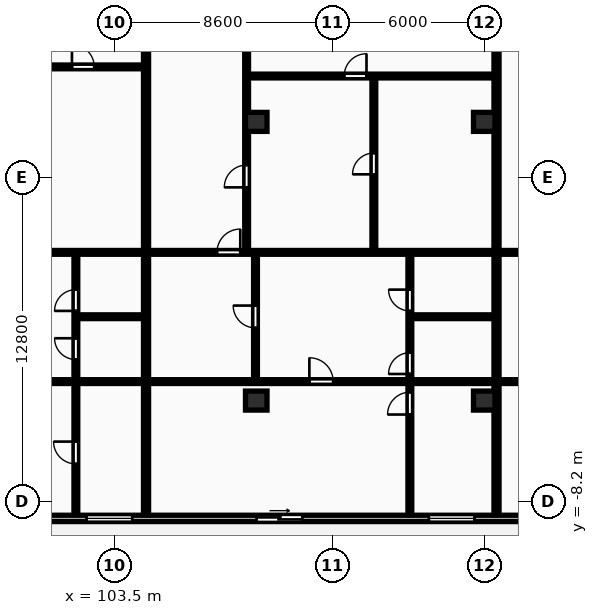
"""IFC4 building model, lengths in metres.
Left out: names, types, materials, properties, quantities, classifications, styles, units other than length and angle.
Written with IfcOpenShell. Run it as: python <this file> out.ifc"""

import sys

from ifc_helpers import new_model, si_unit, direction, frame, frame_2d, origin, origin_2d, place, context, subcontext, project, spatial, rectangle, extrude, element, fill, save


model = new_model("IFC4")
c1 = context("Model", 3, precision=1e-05, world=origin(), true_north=direction((0.0, 1.0)))
c2 = subcontext(c1, "Body", "Model", "MODEL_VIEW")
j1 = project(units=[si_unit("LENGTHUNIT", "METRE"), si_unit("PLANEANGLEUNIT", "RADIAN")], contexts=[c1])
p1 = place(None, origin())
s1 = spatial("IfcSite", under=j1, at=p1, CompositionType="ELEMENT")
p2 = place(p1, origin())
s2 = spatial("IfcBuilding", under=s1, at=p2, CompositionType="ELEMENT")
p3 = place(p2, frame((0.0, 0.0, 113.3)))
s3 = spatial("IfcBuildingStorey", under=s2, at=p3, CompositionType="ELEMENT", Elevation=113.3)
for number, where, z_axis, x_axis in (
    (1, (109.1, -4.2, 0.0), (0.0, 0.0, 1.0), (1.0, 0.0, 0.0)),
    (2, (109.1, 6.8, 0.0), (0.0, 0.0, 1.0), (1.0, 0.0, 0.0)),
    (3, (118.1, -4.2, 0.0), (0.0, 0.0, 1.0), (1.0, 0.0, 0.0)),
    (4, (118.1, 6.8, 0.0), (0.0, 0.0, 1.0), (1.0, 0.0, 0.0)),
):
    element("IfcColumn", number, at=place(p3, frame(where, z_axis=z_axis, x_axis=x_axis)), inside=s3, PredefinedType="COLUMN", context=c2, shape_type="SweptSolid", body=[
        extrude(rectangle(XDim=0.85, YDim=0.75, at=origin_2d()), origin(), (0.0, 0.0, 1.0), 3.25),
    ])
p4 = place(p3, frame((72.7, -8.85, 0.0), z_axis=(0.0, 0.0, 1.0), x_axis=(1.0, 0.0, 0.0)))
e5 = element("IfcWall", 5, at=p4, inside=s3, PredefinedType="STANDARD", context=c2, shape_type="SweptSolid", body=[
    extrude(rectangle(XDim=58.0, YDim=0.25, at=frame_2d((29.0, 0.0))), origin(), (0.0, 0.0, 1.0), 2.97),
])
p5 = place(p4, frame((3.358, 0.0, 0.0)))
e6 = element("IfcOpeningElement", 6, at=p5, cuts=e5, PredefinedType="OPENING", context=c2, shape_type="SweptSolid", body=[
    extrude(rectangle(XDim=1.8, YDim=2.2, at=frame_2d((0.9, 1.1))), frame((0.0, 0.135, 0.0), z_axis=(0.0, -1.0, 0.0), x_axis=(1.0, 0.0, 0.0)), (0.0, 0.0, 1.0), 0.27),
])
p6 = place(p4, frame((12.755, 0.0, 0.85)))
e7 = element("IfcOpeningElement", 7, at=p6, cuts=e5, PredefinedType="OPENING", context=c2, shape_type="SweptSolid", body=[
    extrude(rectangle(XDim=2.4, YDim=1.9, at=frame_2d((1.2, 0.95))), frame((0.0, 0.135, 0.0), z_axis=(0.0, -1.0, 0.0), x_axis=(1.0, 0.0, 0.0)), (0.0, 0.0, 1.0), 0.27),
])
p7 = place(p4, frame((23.617, 0.0, 0.0)))
e8 = element("IfcOpeningElement", 8, at=p7, cuts=e5, PredefinedType="OPENING", context=c2, shape_type="SweptSolid", body=[
    extrude(rectangle(XDim=1.8, YDim=2.2, at=frame_2d((0.9, 1.1))), frame((0.0, 0.135, 0.0), z_axis=(0.0, -1.0, 0.0), x_axis=(1.0, 0.0, 0.0)), (0.0, 0.0, 1.0), 0.27),
])
p8 = place(p4, frame((29.705, 0.0, 0.85)))
e9 = element("IfcOpeningElement", 9, at=p8, cuts=e5, PredefinedType="OPENING", context=c2, shape_type="SweptSolid", body=[
    extrude(rectangle(XDim=1.8, YDim=1.8, at=frame_2d((0.9, 0.9))), frame((0.0, 0.135, 0.0), z_axis=(0.0, -1.0, 0.0), x_axis=(1.0, 0.0, 0.0)), (0.0, 0.0, 1.0), 0.27),
])
p9 = place(p4, frame((36.417, 0.0, 0.0)))
e10 = element("IfcOpeningElement", 10, at=p9, cuts=e5, PredefinedType="OPENING", context=c2, shape_type="SweptSolid", body=[
    extrude(rectangle(XDim=1.8, YDim=2.2, at=frame_2d((0.9, 1.1))), frame((0.0, 0.135, 0.0), z_axis=(0.0, -1.0, 0.0), x_axis=(1.0, 0.0, 0.0)), (0.0, 0.0, 1.0), 0.27),
])
p10 = place(p4, frame((43.213, 0.0, 0.85)))
e11 = element("IfcOpeningElement", 11, at=p10, cuts=e5, PredefinedType="OPENING", context=c2, shape_type="SweptSolid", body=[
    extrude(rectangle(XDim=1.8, YDim=1.8, at=frame_2d((0.9, 0.9))), frame((0.0, 0.135, 0.0), z_axis=(0.0, -1.0, 0.0), x_axis=(1.0, 0.0, 0.0)), (0.0, 0.0, 1.0), 0.27),
])
p11 = place(p4, frame((49.262, 0.0, 0.0)))
e12 = element("IfcOpeningElement", 12, at=p11, cuts=e5, PredefinedType="OPENING", context=c2, shape_type="SweptSolid", body=[
    extrude(rectangle(XDim=1.8, YDim=2.2, at=frame_2d((0.9, 1.1))), frame((0.0, 0.135, 0.0), z_axis=(0.0, -1.0, 0.0), x_axis=(1.0, 0.0, 0.0)), (0.0, 0.0, 1.0), 0.27),
])
p12 = place(p4, frame((54.9, 0.0, 0.85)))
e13 = element("IfcOpeningElement", 13, at=p12, cuts=e5, PredefinedType="OPENING", context=c2, shape_type="SweptSolid", body=[
    extrude(rectangle(XDim=2.4, YDim=1.9, at=frame_2d((1.2, 0.95))), frame((0.0, 0.135, 0.0), z_axis=(0.0, -1.0, 0.0), x_axis=(1.0, 0.0, 0.0)), (0.0, 0.0, 1.0), 0.27),
])
p13 = place(p3, frame((104.75, -8.7, 0.0), z_axis=(0.0, 0.0, 1.0), x_axis=(0.0, 1.0, 0.0)))
e14 = element("IfcWall", 14, at=p13, inside=s3, PredefinedType="PARTITIONING", context=c2, shape_type="SweptSolid", body=[
    extrude(rectangle(XDim=24.57, YDim=0.2, at=frame_2d((12.285, 0.0))), origin(), (0.0, 0.0, 1.0), 2.97),
])
p14 = place(p3, frame((96.363, 8.97, 0.0), z_axis=(0.0, 0.0, 1.0), x_axis=(1.0, 0.0, 0.0)))
e15 = element("IfcWall", 15, at=p14, inside=s3, PredefinedType="PARTITIONING", context=c2, shape_type="SweptSolid", body=[
    extrude(rectangle(XDim=8.307, YDim=0.15, at=frame_2d((4.153, 0.0))), origin(), (0.0, 0.0, 1.0), 2.97),
])
p15 = place(p14, frame((5.462, 0.0, 0.0)))
e16 = element("IfcOpeningElement", 16, at=p15, cuts=e15, PredefinedType="OPENING", context=c2, shape_type="SweptSolid", body=[
    extrude(rectangle(XDim=0.88, YDim=2.06, at=frame_2d((0.44, 1.03))), frame((0.0, 0.085, 0.0), z_axis=(0.0, -1.0, 0.0), x_axis=(1.0, 0.0, 0.0)), (0.0, 0.0, 1.0), 0.17),
])
p16 = place(p3, frame((102.04, -0.89, 0.0), z_axis=(0.0, 0.0, 1.0), x_axis=(1.0, 0.0, 0.0)))
e17 = element("IfcWall", 17, at=p16, inside=s3, PredefinedType="PARTITIONING", context=c2, shape_type="SweptSolid", body=[
    extrude(rectangle(XDim=2.63, YDim=0.15, at=frame_2d((1.315, 0.0))), origin(), (0.0, 0.0, 1.0), 2.97),
])
p17 = place(p3, frame((101.98, -8.7, 0.0), z_axis=(0.0, 0.0, 1.0), x_axis=(0.0, 1.0, 0.0)))
e18 = element("IfcWall", 18, at=p17, inside=s3, PredefinedType="PARTITIONING", context=c2, shape_type="SweptSolid", body=[
    extrude(rectangle(XDim=10.31, YDim=0.15, at=frame_2d((5.155, 0.0))), origin(), (0.0, 0.0, 1.0), 2.97),
])
p18 = place(p17, frame((6.12, 0.0, 0.0)))
e19 = element("IfcOpeningElement", 19, at=p18, cuts=e18, PredefinedType="OPENING", context=c2, shape_type="SweptSolid", body=[
    extrude(rectangle(XDim=0.84, YDim=2.04, at=frame_2d((0.42, 1.02))), frame((0.0, 0.085, 0.0), z_axis=(0.0, -1.0, 0.0), x_axis=(1.0, 0.0, 0.0)), (0.0, 0.0, 1.0), 0.17),
])
p19 = place(p17, frame((8.04, 0.0, 0.0)))
e20 = element("IfcOpeningElement", 20, at=p19, cuts=e18, PredefinedType="OPENING", context=c2, shape_type="SweptSolid", body=[
    extrude(rectangle(XDim=0.84, YDim=2.04, at=frame_2d((0.42, 1.02))), frame((0.0, 0.085, 0.0), z_axis=(0.0, -1.0, 0.0), x_axis=(1.0, 0.0, 0.0)), (0.0, 0.0, 1.0), 0.17),
])
p20 = place(p17, frame((2.001, 0.0, 0.0)))
e21 = element("IfcOpeningElement", 21, at=p20, cuts=e18, PredefinedType="OPENING", context=c2, shape_type="SweptSolid", body=[
    extrude(rectangle(XDim=0.88, YDim=2.06, at=frame_2d((0.44, 1.03))), frame((0.0, 0.085, 0.0), z_axis=(0.0, -1.0, 0.0), x_axis=(1.0, 0.0, 0.0)), (0.0, 0.0, 1.0), 0.17),
])
p21 = place(p3, frame((92.413, 1.65, 0.0), z_axis=(0.0, 0.0, 1.0), x_axis=(1.0, 0.0, 0.0)))
e22 = element("IfcWall", 22, at=p21, inside=s3, PredefinedType="PARTITIONING", context=c2, shape_type="SweptSolid", body=[
    extrude(rectangle(XDim=12.257, YDim=0.15, at=frame_2d((6.128, 0.0))), origin(), (0.0, 0.0, 1.0), 2.97),
])
p22 = place(p21, frame((2.72, 0.0, 0.0)))
e23 = element("IfcOpeningElement", 23, at=p22, cuts=e22, PredefinedType="OPENING", context=c2, shape_type="SweptSolid", body=[
    extrude(rectangle(XDim=0.92, YDim=2.08, at=frame_2d((0.46, 1.04))), frame((0.0, 0.085, 0.0), z_axis=(0.0, -1.0, 0.0), x_axis=(1.0, 0.0, 0.0)), (0.0, 0.0, 1.0), 0.17),
])
p23 = place(p3, frame((92.413, -3.45, 0.0), z_axis=(0.0, 0.0, 1.0), x_axis=(1.0, 0.0, 0.0)))
e24 = element("IfcWall", 24, at=p23, inside=s3, PredefinedType="PARTITIONING", context=c2, shape_type="SweptSolid", body=[
    extrude(rectangle(XDim=12.257, YDim=0.15, at=frame_2d((6.128, 0.0))), origin(), (0.0, 0.0, 1.0), 2.97),
])
p24 = place(p23, frame((5.126, 0.0, 0.0)))
e25 = element("IfcOpeningElement", 25, at=p24, cuts=e24, PredefinedType="OPENING", context=c2, shape_type="SweptSolid", body=[
    extrude(rectangle(XDim=0.94, YDim=2.1, at=frame_2d((0.47, 1.05))), frame((0.0, 0.085, 0.0), z_axis=(0.0, -1.0, 0.0), x_axis=(1.0, 0.0, 0.0)), (0.0, 0.0, 1.0), 0.17),
])
p25 = place(p3, frame((118.583, -8.7, 0.0), z_axis=(0.0, 0.0, 1.0), x_axis=(0.0, 1.0, 0.0)))
e26 = element("IfcWall", 26, at=p25, inside=s3, PredefinedType="PARTITIONING", context=c2, shape_type="SweptSolid", body=[
    extrude(rectangle(XDim=24.57, YDim=0.2, at=frame_2d((12.285, 0.0))), origin(), (0.0, 0.0, 1.0), 2.97),
])
p26 = place(p3, frame((113.742, 1.69, 0.0), z_axis=(0.0, 0.0, 1.0), x_axis=(0.0, 1.0, 0.0)))
e27 = element("IfcWall", 27, at=p26, inside=s3, PredefinedType="PARTITIONING", context=c2, shape_type="SweptSolid", body=[
    extrude(rectangle(XDim=6.92, YDim=0.15, at=frame_2d((3.46, 0.0))), origin(), (0.0, 0.0, 1.0), 2.97),
])
p27 = place(p26, frame((3.04, 0.0, 0.0)))
e28 = element("IfcOpeningElement", 28, at=p27, cuts=e27, PredefinedType="OPENING", context=c2, shape_type="SweptSolid", body=[
    extrude(rectangle(XDim=0.84, YDim=2.04, at=frame_2d((0.42, 1.02))), frame((0.0, 0.085, 0.0), z_axis=(0.0, -1.0, 0.0), x_axis=(1.0, 0.0, 0.0)), (0.0, 0.0, 1.0), 0.17),
])
p28 = place(p3, frame((108.78, 8.61, 0.0), z_axis=(0.0, 0.0, 1.0), x_axis=(1.0, 0.0, 0.0)))
e29 = element("IfcWall", 29, at=p28, inside=s3, PredefinedType="PARTITIONING", context=c2, shape_type="SweptSolid", body=[
    extrude(rectangle(XDim=9.723, YDim=0.15, at=frame_2d((4.862, 0.0))), origin(), (0.0, 0.0, 1.0), 2.97),
])
p29 = place(p28, frame((3.792, 0.0, 0.0)))
e30 = element("IfcOpeningElement", 30, at=p29, cuts=e29, PredefinedType="OPENING", context=c2, shape_type="SweptSolid", body=[
    extrude(rectangle(XDim=0.88, YDim=2.06, at=frame_2d((0.44, 1.03))), frame((0.0, 0.085, 0.0), z_axis=(0.0, -1.0, 0.0), x_axis=(1.0, 0.0, 0.0)), (0.0, 0.0, 1.0), 0.17),
])
p30 = place(p3, frame((108.72, 1.69, 0.0), z_axis=(0.0, 0.0, 1.0), x_axis=(0.0, 1.0, 0.0)))
e31 = element("IfcWall", 31, at=p30, inside=s3, PredefinedType="PARTITIONING", context=c2, shape_type="SweptSolid", body=[
    extrude(rectangle(XDim=14.2, YDim=0.15, at=frame_2d((7.1, 0.0))), origin(), (0.0, 0.0, 1.0), 2.97),
])
p31 = place(p30, frame((2.526, 0.0, 0.0)))
e32 = element("IfcOpeningElement", 32, at=p31, cuts=e31, PredefinedType="OPENING", context=c2, shape_type="SweptSolid", body=[
    extrude(rectangle(XDim=0.88, YDim=2.06, at=frame_2d((0.44, 1.03))), frame((0.0, 0.085, 0.0), z_axis=(0.0, -1.0, 0.0), x_axis=(1.0, 0.0, 0.0)), (0.0, 0.0, 1.0), 0.17),
])
p32 = place(p3, frame((109.07, -3.39, 0.0), z_axis=(0.0, 0.0, 1.0), x_axis=(0.0, 1.0, 0.0)))
e33 = element("IfcWall", 33, at=p32, inside=s3, PredefinedType="PARTITIONING", context=c2, shape_type="SweptSolid", body=[
    extrude(rectangle(XDim=5.0, YDim=0.15, at=frame_2d((2.5, 0.0))), origin(), (0.0, 0.0, 1.0), 2.2),
])
p33 = place(p32, frame((2.06, 0.0, 0.0)))
e34 = element("IfcOpeningElement", 34, at=p33, cuts=e33, PredefinedType="OPENING", context=c2, shape_type="SweptSolid", body=[
    extrude(rectangle(XDim=0.88, YDim=2.06, at=frame_2d((0.44, 1.03))), frame((0.0, 0.085, 0.0), z_axis=(0.0, -1.0, 0.0), x_axis=(1.0, 0.0, 0.0)), (0.0, 0.0, 1.0), 0.17),
])
p34 = place(p3, frame((115.223, -0.89, 0.0), z_axis=(0.0, 0.0, 1.0), x_axis=(1.0, 0.0, 0.0)))
e35 = element("IfcWall", 35, at=p34, inside=s3, PredefinedType="PARTITIONING", context=c2, shape_type="SweptSolid", body=[
    extrude(rectangle(XDim=3.28, YDim=0.15, at=frame_2d((1.64, 0.0))), origin(), (0.0, 0.0, 1.0), 2.97),
])
p35 = place(p3, frame((115.163, -8.7, 0.0), z_axis=(0.0, 0.0, 1.0), x_axis=(0.0, 1.0, 0.0)))
e36 = element("IfcWall", 36, at=p35, inside=s3, PredefinedType="PARTITIONING", context=c2, shape_type="SweptSolid", body=[
    extrude(rectangle(XDim=10.31, YDim=0.15, at=frame_2d((5.155, 0.0))), origin(), (0.0, 0.0, 1.0), 2.97),
])
p36 = place(p35, frame((5.55, 0.0, 0.0)))
e37 = element("IfcOpeningElement", 37, at=p36, cuts=e36, PredefinedType="OPENING", context=c2, shape_type="SweptSolid", body=[
    extrude(rectangle(XDim=0.84, YDim=2.04, at=frame_2d((0.42, 1.02))), frame((0.0, 0.085, 0.0), z_axis=(0.0, -1.0, 0.0), x_axis=(1.0, 0.0, 0.0)), (0.0, 0.0, 1.0), 0.17),
])
p37 = place(p35, frame((8.04, 0.0, 0.0)))
e38 = element("IfcOpeningElement", 38, at=p37, cuts=e36, PredefinedType="OPENING", context=c2, shape_type="SweptSolid", body=[
    extrude(rectangle(XDim=0.84, YDim=2.04, at=frame_2d((0.42, 1.02))), frame((0.0, 0.085, 0.0), z_axis=(0.0, -1.0, 0.0), x_axis=(1.0, 0.0, 0.0)), (0.0, 0.0, 1.0), 0.17),
])
p38 = place(p35, frame((3.95, 0.0, 0.0)))
e39 = element("IfcOpeningElement", 39, at=p38, cuts=e36, PredefinedType="OPENING", context=c2, shape_type="SweptSolid", body=[
    extrude(rectangle(XDim=0.88, YDim=2.06, at=frame_2d((0.44, 1.03))), frame((0.0, 0.085, 0.0), z_axis=(0.0, -1.0, 0.0), x_axis=(1.0, 0.0, 0.0)), (0.0, 0.0, 1.0), 0.17),
])
p39 = place(p3, frame((104.83, 1.65, 0.0), z_axis=(0.0, 0.0, 1.0), x_axis=(1.0, 0.0, 0.0)))
e40 = element("IfcWall", 40, at=p39, inside=s3, PredefinedType="PARTITIONING", context=c2, shape_type="SweptSolid", body=[
    extrude(rectangle(XDim=13.673, YDim=0.15, at=frame_2d((6.837, 0.0))), origin(), (0.0, 0.0, 1.0), 2.97),
])
p40 = place(p39, frame((2.72, 0.0, 0.0)))
e41 = element("IfcOpeningElement", 41, at=p40, cuts=e40, PredefinedType="OPENING", context=c2, shape_type="SweptSolid", body=[
    extrude(rectangle(XDim=0.92, YDim=2.08, at=frame_2d((0.46, 1.04))), frame((0.0, 0.085, 0.0), z_axis=(0.0, -1.0, 0.0), x_axis=(1.0, 0.0, 0.0)), (0.0, 0.0, 1.0), 0.17),
])
p41 = place(p3, frame((104.83, -3.45, 0.0), z_axis=(0.0, 0.0, 1.0), x_axis=(1.0, 0.0, 0.0)))
e42 = element("IfcWall", 42, at=p41, inside=s3, PredefinedType="PARTITIONING", context=c2, shape_type="SweptSolid", body=[
    extrude(rectangle(XDim=13.673, YDim=0.15, at=frame_2d((6.837, 0.0))), origin(), (0.0, 0.0, 1.0), 2.97),
])
p42 = place(p41, frame((6.367, 0.0, 0.0)))
e43 = element("IfcOpeningElement", 43, at=p42, cuts=e42, PredefinedType="OPENING", context=c2, shape_type="SweptSolid", body=[
    extrude(rectangle(XDim=0.94, YDim=2.1, at=frame_2d((0.47, 1.05))), frame((0.0, 0.085, 0.0), z_axis=(0.0, -1.0, 0.0), x_axis=(1.0, 0.0, 0.0)), (0.0, 0.0, 1.0), 0.17),
])
p43 = place(p3, frame((118.663, 1.65, 0.0), z_axis=(0.0, 0.0, 1.0), x_axis=(1.0, 0.0, 0.0)))
e44 = element("IfcWall", 44, at=p43, inside=s3, PredefinedType="PARTITIONING", context=c2, shape_type="SweptSolid", body=[
    extrude(rectangle(XDim=11.957, YDim=0.15, at=frame_2d((5.979, 0.0))), origin(), (0.0, 0.0, 1.0), 2.97),
])
p44 = place(p43, frame((2.72, 0.0, 0.0)))
e45 = element("IfcOpeningElement", 45, at=p44, cuts=e44, PredefinedType="OPENING", context=c2, shape_type="SweptSolid", body=[
    extrude(rectangle(XDim=0.92, YDim=2.08, at=frame_2d((0.46, 1.04))), frame((0.0, 0.085, 0.0), z_axis=(0.0, -1.0, 0.0), x_axis=(1.0, 0.0, 0.0)), (0.0, 0.0, 1.0), 0.17),
])
p45 = place(p3, frame((118.663, -3.45, 0.0), z_axis=(0.0, 0.0, 1.0), x_axis=(1.0, 0.0, 0.0)))
e46 = element("IfcWall", 46, at=p45, inside=s3, PredefinedType="PARTITIONING", context=c2, shape_type="SweptSolid", body=[
    extrude(rectangle(XDim=11.957, YDim=0.15, at=frame_2d((5.979, 0.0))), origin(), (0.0, 0.0, 1.0), 2.97),
])
p46 = place(p45, frame((6.613, 0.0, 0.0)))
e47 = element("IfcOpeningElement", 47, at=p46, cuts=e46, PredefinedType="OPENING", context=c2, shape_type="SweptSolid", body=[
    extrude(rectangle(XDim=0.94, YDim=2.1, at=frame_2d((0.47, 1.05))), frame((0.0, 0.085, 0.0), z_axis=(0.0, -1.0, 0.0), x_axis=(1.0, 0.0, 0.0)), (0.0, 0.0, 1.0), 0.17),
])
p47 = place(p8, origin())
e48 = element("IfcWindow", 48, at=p47, inside=s3, PartitioningType="SINGLE_PANEL", PredefinedType="WINDOW", context=c2, shape_type="SweptSolid", body=[
    extrude(rectangle(XDim=1.8, YDim=1.8, at=frame_2d((0.9, 0.9))), frame((0.0, 0.03, 0.0), z_axis=(0.0, -1.0, 0.0), x_axis=(1.0, 0.0, 0.0)), (0.0, 0.0, 1.0), 0.06),
])
fill(e9, e48)
p48 = place(p9, origin())
e49 = element("IfcDoor", 49, at=p48, inside=s3, OperationType="SLIDING_TO_RIGHT", PredefinedType="DOOR", context=c2, shape_type="SweptSolid", body=[
    extrude(rectangle(XDim=1.8, YDim=2.2, at=frame_2d((0.9, 1.1))), frame((0.0, 0.025, 0.0), z_axis=(0.0, -1.0, 0.0), x_axis=(1.0, 0.0, 0.0)), (0.0, 0.0, 1.0), 0.05),
])
fill(e10, e49)
p49 = place(p10, origin())
e50 = element("IfcWindow", 50, at=p49, inside=s3, PartitioningType="SINGLE_PANEL", PredefinedType="WINDOW", context=c2, shape_type="SweptSolid", body=[
    extrude(rectangle(XDim=1.8, YDim=1.8, at=frame_2d((0.9, 0.9))), frame((0.0, 0.03, 0.0), z_axis=(0.0, -1.0, 0.0), x_axis=(1.0, 0.0, 0.0)), (0.0, 0.0, 1.0), 0.06),
])
fill(e11, e50)
p50 = place(p15, origin())
e51 = element("IfcDoor", 51, at=p50, inside=s3, OperationType="SINGLE_SWING_LEFT", PredefinedType="DOOR", context=c2, shape_type="SweptSolid", body=[
    extrude(rectangle(XDim=0.88, YDim=2.06, at=frame_2d((0.44, 1.03))), frame((0.0, 0.025, 0.0), z_axis=(0.0, -1.0, 0.0), x_axis=(1.0, 0.0, 0.0)), (0.0, 0.0, 1.0), 0.05),
])
fill(e16, e51)
p51 = place(p18, origin())
e52 = element("IfcDoor", 52, at=p51, inside=s3, OperationType="SINGLE_SWING_RIGHT", PredefinedType="DOOR", context=c2, shape_type="SweptSolid", body=[
    extrude(rectangle(XDim=0.84, YDim=2.04, at=frame_2d((0.42, 1.02))), frame((0.0, 0.025, 0.0), z_axis=(0.0, -1.0, 0.0), x_axis=(1.0, 0.0, 0.0)), (0.0, 0.0, 1.0), 0.05),
])
fill(e19, e52)
p52 = place(p19, origin())
e53 = element("IfcDoor", 53, at=p52, inside=s3, OperationType="SINGLE_SWING_LEFT", PredefinedType="DOOR", context=c2, shape_type="SweptSolid", body=[
    extrude(rectangle(XDim=0.84, YDim=2.04, at=frame_2d((0.42, 1.02))), frame((0.0, 0.025, 0.0), z_axis=(0.0, -1.0, 0.0), x_axis=(1.0, 0.0, 0.0)), (0.0, 0.0, 1.0), 0.05),
])
fill(e20, e53)
p53 = place(p20, origin())
e54 = element("IfcDoor", 54, at=p53, inside=s3, OperationType="SINGLE_SWING_RIGHT", PredefinedType="DOOR", context=c2, shape_type="SweptSolid", body=[
    extrude(rectangle(XDim=0.88, YDim=2.06, at=frame_2d((0.44, 1.03))), frame((0.0, 0.025, 0.0), z_axis=(0.0, -1.0, 0.0), x_axis=(1.0, 0.0, 0.0)), (0.0, 0.0, 1.0), 0.05),
])
fill(e21, e54)
p54 = place(p27, origin())
e55 = element("IfcDoor", 55, at=p54, inside=s3, OperationType="SINGLE_SWING_LEFT", PredefinedType="DOOR", context=c2, shape_type="SweptSolid", body=[
    extrude(rectangle(XDim=0.84, YDim=2.04, at=frame_2d((0.42, 1.02))), frame((0.0, 0.025, 0.0), z_axis=(0.0, -1.0, 0.0), x_axis=(1.0, 0.0, 0.0)), (0.0, 0.0, 1.0), 0.05),
])
fill(e28, e55)
p55 = place(p29, origin())
e56 = element("IfcDoor", 56, at=p55, inside=s3, OperationType="SINGLE_SWING_RIGHT", PredefinedType="DOOR", context=c2, shape_type="SweptSolid", body=[
    extrude(rectangle(XDim=0.88, YDim=2.06, at=frame_2d((0.44, 1.03))), frame((0.0, 0.025, 0.0), z_axis=(0.0, -1.0, 0.0), x_axis=(1.0, 0.0, 0.0)), (0.0, 0.0, 1.0), 0.05),
])
fill(e30, e56)
p56 = place(p31, origin())
e57 = element("IfcDoor", 57, at=p56, inside=s3, OperationType="SINGLE_SWING_LEFT", PredefinedType="DOOR", context=c2, shape_type="SweptSolid", body=[
    extrude(rectangle(XDim=0.88, YDim=2.06, at=frame_2d((0.44, 1.03))), frame((0.0, 0.025, 0.0), z_axis=(0.0, -1.0, 0.0), x_axis=(1.0, 0.0, 0.0)), (0.0, 0.0, 1.0), 0.05),
])
fill(e32, e57)
p57 = place(p33, origin())
e58 = element("IfcDoor", 58, at=p57, inside=s3, OperationType="SINGLE_SWING_RIGHT", PredefinedType="DOOR", context=c2, shape_type="SweptSolid", body=[
    extrude(rectangle(XDim=0.88, YDim=2.06, at=frame_2d((0.44, 1.03))), frame((0.0, 0.025, 0.0), z_axis=(0.0, -1.0, 0.0), x_axis=(1.0, 0.0, 0.0)), (0.0, 0.0, 1.0), 0.05),
])
fill(e34, e58)
p58 = place(p36, origin())
e59 = element("IfcDoor", 59, at=p58, inside=s3, OperationType="SINGLE_SWING_LEFT", PredefinedType="DOOR", context=c2, shape_type="SweptSolid", body=[
    extrude(rectangle(XDim=0.84, YDim=2.04, at=frame_2d((0.42, 1.02))), frame((0.0, 0.025, 0.0), z_axis=(0.0, -1.0, 0.0), x_axis=(1.0, 0.0, 0.0)), (0.0, 0.0, 1.0), 0.05),
])
fill(e37, e59)
p59 = place(p37, origin())
e60 = element("IfcDoor", 60, at=p59, inside=s3, OperationType="SINGLE_SWING_RIGHT", PredefinedType="DOOR", context=c2, shape_type="SweptSolid", body=[
    extrude(rectangle(XDim=0.84, YDim=2.04, at=frame_2d((0.42, 1.02))), frame((0.0, 0.025, 0.0), z_axis=(0.0, -1.0, 0.0), x_axis=(1.0, 0.0, 0.0)), (0.0, 0.0, 1.0), 0.05),
])
fill(e38, e60)
p60 = place(p38, origin())
e61 = element("IfcDoor", 61, at=p60, inside=s3, OperationType="SINGLE_SWING_LEFT", PredefinedType="DOOR", context=c2, shape_type="SweptSolid", body=[
    extrude(rectangle(XDim=0.88, YDim=2.06, at=frame_2d((0.44, 1.03))), frame((0.0, 0.025, 0.0), z_axis=(0.0, -1.0, 0.0), x_axis=(1.0, 0.0, 0.0)), (0.0, 0.0, 1.0), 0.05),
])
fill(e39, e61)
p61 = place(p40, origin())
e62 = element("IfcDoor", 62, at=p61, inside=s3, OperationType="SINGLE_SWING_RIGHT", PredefinedType="DOOR", context=c2, shape_type="SweptSolid", body=[
    extrude(rectangle(XDim=0.92, YDim=2.08, at=frame_2d((0.46, 1.04))), frame((0.0, 0.025, 0.0), z_axis=(0.0, -1.0, 0.0), x_axis=(1.0, 0.0, 0.0)), (0.0, 0.0, 1.0), 0.05),
])
fill(e41, e62)
p62 = place(p42, origin())
e63 = element("IfcDoor", 63, at=p62, inside=s3, OperationType="SINGLE_SWING_LEFT", PredefinedType="DOOR", context=c2, shape_type="SweptSolid", body=[
    extrude(rectangle(XDim=0.94, YDim=2.1, at=frame_2d((0.47, 1.05))), frame((0.0, 0.025, 0.0), z_axis=(0.0, -1.0, 0.0), x_axis=(1.0, 0.0, 0.0)), (0.0, 0.0, 1.0), 0.05),
])
fill(e43, e63)
save(model, sys.argv[1])
